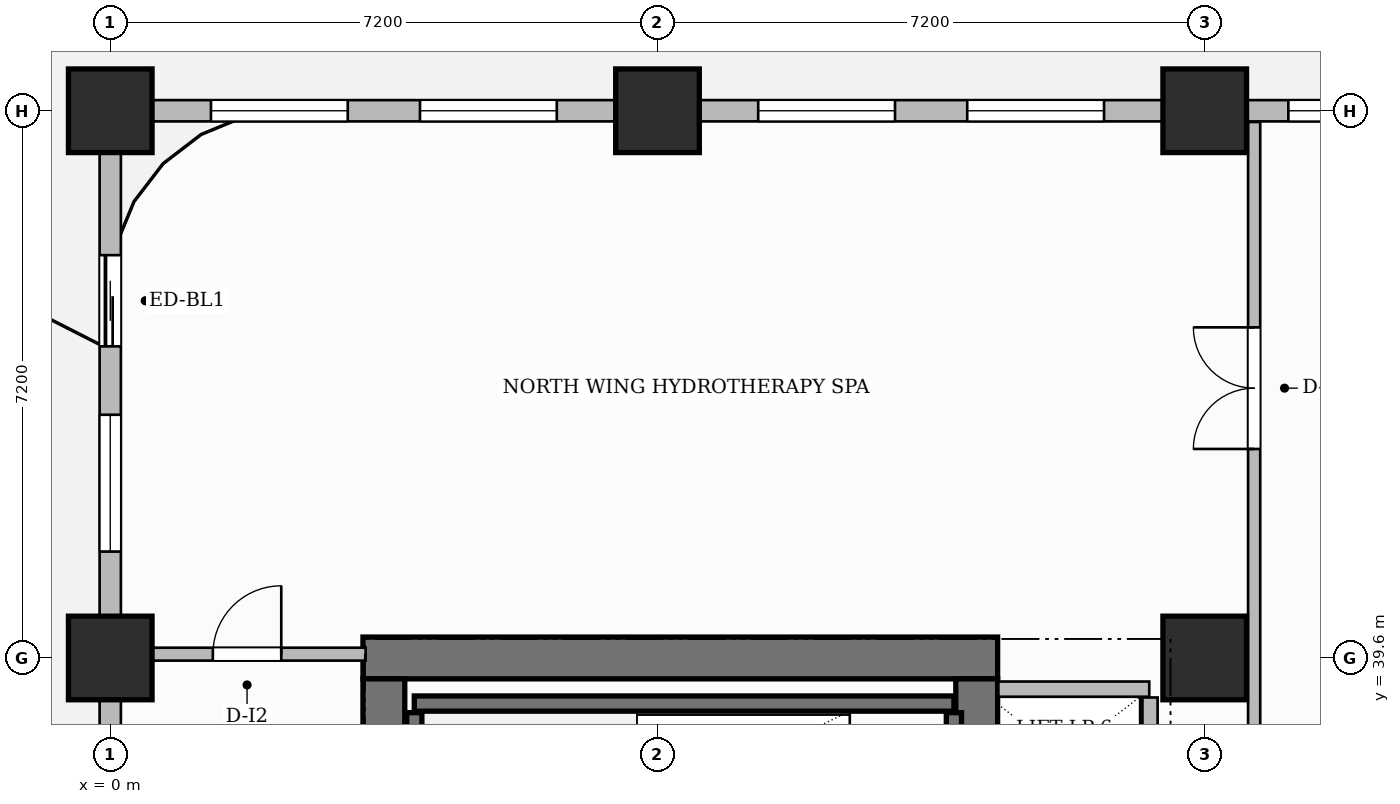
"""IFC4 building model, lengths in metres.
Left out: names, types, materials, properties, quantities, classifications, styles, units other than length and angle.
Written with IfcOpenShell. Run it as: python <this file> out.ifc"""

import sys

from ifc_helpers import new_model, si_unit, direction, frame, frame_2d, origin, origin_2d, place, context, subcontext, project, spatial, rectangle, extrude, source, transform, mapped, element, fill, save


model = new_model("IFC4")
c1 = context("Model", 3, precision=1e-05, world=origin(), true_north=direction((0.0, 1.0)))
c2 = subcontext(c1, "Body", "Model", "MODEL_VIEW")
j1 = project(units=[si_unit("LENGTHUNIT", "METRE"), si_unit("PLANEANGLEUNIT", "RADIAN")], contexts=[c1])
p1 = place(None, origin())
s1 = spatial("IfcSite", under=j1, at=p1, CompositionType="ELEMENT")
p2 = place(p1, origin())
s2 = spatial("IfcBuilding", under=s1, at=p2, CompositionType="ELEMENT")
p3 = place(p2, frame((0.0, 0.0, 95.3)))
s3 = spatial("IfcBuildingStorey", under=s2, at=p3, CompositionType="ELEMENT", Elevation=95.3)
p4 = place(p3, frame((3.325, 39.6, 0.0), z_axis=(0.0, 0.0, 1.0), x_axis=(1.0, 0.0, 0.0)))
e1 = element("IfcWall", 1, at=p4, inside=s3, PredefinedType="SHEAR", context=c2, shape_type="SweptSolid", body=[
    extrude(rectangle(XDim=8.35, YDim=0.55, at=frame_2d((4.175, 0.0))), origin(), (0.0, 0.0, 1.0), 3.7),
])
p5 = place(p3, frame((3.6, 25.475, 0.0), z_axis=(0.0, 0.0, 1.0), x_axis=(0.0, 1.0, 0.0)))
e2 = element("IfcWall", 2, at=p5, inside=s3, PredefinedType="SHEAR", context=c2, shape_type="SweptSolid", body=[
    extrude(rectangle(XDim=13.85, YDim=0.55, at=frame_2d((6.925, 0.0))), origin(), (0.0, 0.0, 1.0), 3.7),
])
p6 = place(p3, frame((11.4, 25.475, 0.0), z_axis=(0.0, 0.0, 1.0), x_axis=(0.0, 1.0, 0.0)))
e3 = element("IfcWall", 3, at=p6, inside=s3, PredefinedType="SHEAR", context=c2, shape_type="SweptSolid", body=[
    extrude(rectangle(XDim=13.85, YDim=0.55, at=frame_2d((6.925, 0.0))), origin(), (0.0, 0.0, 1.0), 3.7),
])
p7 = place(p6, frame((6.495, 0.0, 0.0)))
e4 = element("IfcOpeningElement", 4, at=p7, cuts=e3, PredefinedType="OPENING", context=c2, shape_type="SweptSolid", body=[
    extrude(rectangle(XDim=1.5, YDim=2.2, at=frame_2d((0.75, 1.1))), frame((0.0, 0.285, 0.0), z_axis=(0.0, -1.0, 0.0), x_axis=(1.0, 0.0, 0.0)), (0.0, 0.0, 1.0), 0.57),
])
m1 = source(origin(), c2, "Body", "SweptSolid", [
    extrude(rectangle(XDim=1.1, YDim=1.1, at=origin_2d()), origin(), (0.0, 0.0, 1.0), 3.7),
])
for number, where, z_axis, x_axis in (
    (5, (0.0, 39.6, 0.0), (0.0, 0.0, 1.0), (1.0, 0.0, 0.0)),
    (6, (0.0, 46.8, 0.0), (0.0, 0.0, 1.0), (1.0, 0.0, 0.0)),
    (7, (7.2, 46.8, 0.0), (0.0, 0.0, 1.0), (1.0, 0.0, 0.0)),
    (8, (14.4, 39.6, 0.0), (0.0, 0.0, 1.0), (1.0, 0.0, 0.0)),
    (9, (14.4, 46.8, 0.0), (0.0, 0.0, 1.0), (1.0, 0.0, 0.0)),
):
    element("IfcColumn", number, at=place(p3, frame(where, z_axis=z_axis, x_axis=x_axis)), inside=s3, PredefinedType="COLUMN", context=c2, shape_type="MappedRepresentation", body=[
        mapped(m1, transform((0.0, 0.0, 0.0), scale=1.0)),
    ])
p8 = place(p3, frame((4.0, 39.0, 0.0), z_axis=(0.0, 0.0, 1.0), x_axis=(1.0, 0.0, 0.0)))
e10 = element("IfcWall", 10, at=p8, inside=s3, PredefinedType="SHEAR", context=c2, shape_type="SweptSolid", body=[
    extrude(rectangle(XDim=7.1, YDim=0.2, at=frame_2d((3.55, 0.0))), origin(), (0.0, 0.0, 1.0), 3.7),
])
for number, where, z_axis, x_axis in (
    (11, (4.0, 36.18, 0.0), (0.0, 0.0, 1.0), (0.0, 1.0, 0.0)),
    (12, (11.1, 36.18, 0.0), (0.0, 0.0, 1.0), (0.0, 1.0, 0.0)),
):
    element("IfcWall", number, at=place(p3, frame(where, z_axis=z_axis, x_axis=x_axis)), inside=s3, PredefinedType="SHEAR", context=c2, shape_type="SweptSolid", body=[
        extrude(rectangle(XDim=2.7, YDim=0.2, at=frame_2d((1.35, 0.0))), origin(), (0.0, 0.0, 1.0), 3.7),
    ])
p9 = place(p3, frame((11.685, 39.19, 0.0), z_axis=(0.0, 0.0, 1.0), x_axis=(1.0, 0.0, 0.0)))
e13 = element("IfcWall", 13, at=p9, inside=s3, PredefinedType="PARTITIONING", context=c2, shape_type="SweptSolid", body=[
    extrude(rectangle(XDim=1.985, YDim=0.2, at=frame_2d((0.992, 0.0))), origin(), (0.0, 0.0, 1.0), 3.45),
])
p10 = place(p3, frame((13.68, 34.36, 0.0), z_axis=(0.0, 0.0, 1.0), x_axis=(0.0, 1.0, 0.0)))
e14 = element("IfcWall", 14, at=p10, inside=s3, PredefinedType="PARTITIONING", context=c2, shape_type="SweptSolid", body=[
    extrude(rectangle(XDim=4.72, YDim=0.2, at=frame_2d((2.36, 0.0))), origin(), (0.0, 0.0, 1.0), 3.45),
])
p11 = place(p3, frame((0.24, 39.65, 0.0), z_axis=(0.0, 0.0, 1.0), x_axis=(1.0, 0.0, 0.0)))
e15 = element("IfcWall", 15, at=p11, inside=s3, PredefinedType="PARTITIONING", context=c2, shape_type="SweptSolid", body=[
    extrude(rectangle(XDim=3.12, YDim=0.17, at=frame_2d((1.56, 0.0))), origin(), (0.0, 0.0, 1.0), 3.45),
])
p12 = place(p11, frame((1.11, 0.0, 0.0)))
e16 = element("IfcOpeningElement", 16, at=p12, cuts=e15, PredefinedType="OPENING", context=c2, shape_type="SweptSolid", body=[
    extrude(rectangle(XDim=0.9, YDim=2.15, at=frame_2d((0.45, 1.075))), frame((0.0, 0.095, 0.0), z_axis=(0.0, -1.0, 0.0), x_axis=(1.0, 0.0, 0.0)), (0.0, 0.0, 1.0), 0.19),
])
p13 = place(p3, frame((15.05, 34.34, 0.0), z_axis=(0.0, 0.0, 1.0), x_axis=(0.0, 1.0, 0.0)))
e17 = element("IfcWall", 17, at=p13, inside=s3, PredefinedType="PARTITIONING", context=c2, shape_type="SweptSolid", body=[
    extrude(rectangle(XDim=12.312, YDim=0.16, at=frame_2d((6.156, 0.0))), origin(), (0.0, 0.0, 1.0), 3.45),
])
p14 = place(p13, frame((8.01, 0.0, 0.0)))
e18 = element("IfcOpeningElement", 18, at=p14, cuts=e17, PredefinedType="OPENING", context=c2, shape_type="SweptSolid", body=[
    extrude(rectangle(XDim=1.6, YDim=2.4, at=frame_2d((0.8, 1.2))), frame((0.0, 0.09, 0.0), z_axis=(0.0, -1.0, 0.0), x_axis=(1.0, 0.0, 0.0)), (0.0, 0.0, 1.0), 0.18),
])
p15 = place(p3, frame((0.0, 25.25, 0.0), z_axis=(0.0, 0.0, 1.0), x_axis=(0.0, 1.0, 0.0)))
e19 = element("IfcWall", 19, at=p15, inside=s3, PredefinedType="SOLIDWALL", context=c2, shape_type="SweptSolid", body=[
    extrude(rectangle(XDim=21.5, YDim=0.28, at=frame_2d((10.75, 0.0))), origin(), (0.0, 0.0, 1.0), 2.885),
])
p16 = place(p15, frame((18.45, 0.0, 0.0)))
e20 = element("IfcOpeningElement", 20, at=p16, cuts=e19, PredefinedType="OPENING", context=c2, shape_type="SweptSolid", body=[
    extrude(rectangle(XDim=1.2, YDim=2.2, at=frame_2d((0.6, 1.1))), frame((0.0, 0.15, 0.0), z_axis=(0.0, -1.0, 0.0), x_axis=(1.0, 0.0, 0.0)), (0.0, 0.0, 1.0), 0.3),
])
p17 = place(p15, frame((0.8, 0.0, 0.0)))
e21 = element("IfcOpeningElement", 21, at=p17, cuts=e19, PredefinedType="OPENING", context=c2, shape_type="SweptSolid", body=[
    extrude(rectangle(XDim=1.2, YDim=2.2, at=frame_2d((0.6, 1.1))), frame((0.0, 0.15, 0.0), z_axis=(0.0, -1.0, 0.0), x_axis=(1.0, 0.0, 0.0)), (0.0, 0.0, 1.0), 0.3),
])
p18 = place(p15, frame((3.425, 0.0, 0.8)))
e22 = element("IfcOpeningElement", 22, at=p18, cuts=e19, PredefinedType="OPENING", context=c2, shape_type="SweptSolid", body=[
    extrude(rectangle(XDim=1.8, YDim=1.85, at=frame_2d((0.9, 0.925))), frame((0.0, 0.15, 0.0), z_axis=(0.0, -1.0, 0.0), x_axis=(1.0, 0.0, 0.0)), (0.0, 0.0, 1.0), 0.3),
])
p19 = place(p15, frame((8.475, 0.0, 0.8)))
e23 = element("IfcOpeningElement", 23, at=p19, cuts=e19, PredefinedType="OPENING", context=c2, shape_type="SweptSolid", body=[
    extrude(rectangle(XDim=1.8, YDim=1.85, at=frame_2d((0.9, 0.925))), frame((0.0, 0.15, 0.0), z_axis=(0.0, -1.0, 0.0), x_axis=(1.0, 0.0, 0.0)), (0.0, 0.0, 1.0), 0.3),
])
p20 = place(p15, frame((11.225, 0.0, 0.8)))
e24 = element("IfcOpeningElement", 24, at=p20, cuts=e19, PredefinedType="OPENING", context=c2, shape_type="SweptSolid", body=[
    extrude(rectangle(XDim=1.8, YDim=1.85, at=frame_2d((0.9, 0.925))), frame((0.0, 0.15, 0.0), z_axis=(0.0, -1.0, 0.0), x_axis=(1.0, 0.0, 0.0)), (0.0, 0.0, 1.0), 0.3),
])
p21 = place(p15, frame((15.75, 0.0, 0.8)))
e25 = element("IfcOpeningElement", 25, at=p21, cuts=e19, PredefinedType="OPENING", context=c2, shape_type="SweptSolid", body=[
    extrude(rectangle(XDim=1.8, YDim=1.85, at=frame_2d((0.9, 0.925))), frame((0.0, 0.15, 0.0), z_axis=(0.0, -1.0, 0.0), x_axis=(1.0, 0.0, 0.0)), (0.0, 0.0, 1.0), 0.3),
])
p22 = place(p3, frame((0.0, 46.8, 0.0), z_axis=(0.0, 0.0, 1.0), x_axis=(1.0, 0.0, 0.0)))
e26 = element("IfcWall", 26, at=p22, inside=s3, PredefinedType="SOLIDWALL", context=c2, shape_type="SweptSolid", body=[
    extrude(rectangle(XDim=18.0, YDim=0.28, at=frame_2d((9.0, 0.0))), origin(), (0.0, 0.0, 1.0), 2.885),
])
p23 = place(p22, frame((1.325, 0.0, 0.8)))
e27 = element("IfcOpeningElement", 27, at=p23, cuts=e26, PredefinedType="OPENING", context=c2, shape_type="SweptSolid", body=[
    extrude(rectangle(XDim=1.8, YDim=1.85, at=frame_2d((0.9, 0.925))), frame((0.0, 0.15, 0.0), z_axis=(0.0, -1.0, 0.0), x_axis=(1.0, 0.0, 0.0)), (0.0, 0.0, 1.0), 0.3),
])
p24 = place(p22, frame((4.075, 0.0, 0.8)))
e28 = element("IfcOpeningElement", 28, at=p24, cuts=e26, PredefinedType="OPENING", context=c2, shape_type="SweptSolid", body=[
    extrude(rectangle(XDim=1.8, YDim=1.85, at=frame_2d((0.9, 0.925))), frame((0.0, 0.15, 0.0), z_axis=(0.0, -1.0, 0.0), x_axis=(1.0, 0.0, 0.0)), (0.0, 0.0, 1.0), 0.3),
])
p25 = place(p22, frame((8.525, 0.0, 0.8)))
e29 = element("IfcOpeningElement", 29, at=p25, cuts=e26, PredefinedType="OPENING", context=c2, shape_type="SweptSolid", body=[
    extrude(rectangle(XDim=1.8, YDim=1.85, at=frame_2d((0.9, 0.925))), frame((0.0, 0.15, 0.0), z_axis=(0.0, -1.0, 0.0), x_axis=(1.0, 0.0, 0.0)), (0.0, 0.0, 1.0), 0.3),
])
p26 = place(p22, frame((11.275, 0.0, 0.8)))
e30 = element("IfcOpeningElement", 30, at=p26, cuts=e26, PredefinedType="OPENING", context=c2, shape_type="SweptSolid", body=[
    extrude(rectangle(XDim=1.8, YDim=1.85, at=frame_2d((0.9, 0.925))), frame((0.0, 0.15, 0.0), z_axis=(0.0, -1.0, 0.0), x_axis=(1.0, 0.0, 0.0)), (0.0, 0.0, 1.0), 0.3),
])
p27 = place(p22, frame((15.5, 0.0, 0.8)))
e31 = element("IfcOpeningElement", 31, at=p27, cuts=e26, PredefinedType="OPENING", context=c2, shape_type="SweptSolid", body=[
    extrude(rectangle(XDim=1.4, YDim=1.85, at=frame_2d((0.7, 0.925))), frame((0.0, 0.15, 0.0), z_axis=(0.0, -1.0, 0.0), x_axis=(1.0, 0.0, 0.0)), (0.0, 0.0, 1.0), 0.3),
])
m2 = source(origin(), c2, "Body", "SweptSolid", [
    extrude(rectangle(XDim=0.9, YDim=2.15, at=frame_2d((0.45, 1.075))), frame((0.0, 0.025, 0.0), z_axis=(0.0, -1.0, 0.0), x_axis=(1.0, 0.0, 0.0)), (0.0, 0.0, 1.0), 0.05),
])
p28 = place(p12, origin())
e32 = element("IfcDoor", 32, at=p28, inside=s3, OperationType="SINGLE_SWING_RIGHT", PredefinedType="DOOR", context=c2, shape_type="MappedRepresentation", body=[
    mapped(m2, transform((0.0, 0.0, 0.0), scale=1.0)),
])
fill(e16, e32)
m3 = source(origin(), c2, "Body", "SweptSolid", [
    extrude(rectangle(XDim=1.6, YDim=2.4, at=frame_2d((0.8, 1.2))), frame((0.0, 0.025, 0.0), z_axis=(0.0, -1.0, 0.0), x_axis=(1.0, 0.0, 0.0)), (0.0, 0.0, 1.0), 0.05),
])
p29 = place(p14, origin())
e33 = element("IfcDoor", 33, at=p29, inside=s3, OperationType="DOUBLE_DOOR_SINGLE_SWING", PredefinedType="DOOR", context=c2, shape_type="MappedRepresentation", body=[
    mapped(m3, transform((0.0, 0.0, 0.0), scale=1.0)),
])
fill(e18, e33)
m4 = source(origin(), c2, "Body", "SweptSolid", [
    extrude(rectangle(XDim=1.2, YDim=2.2, at=frame_2d((0.6, 1.1))), frame((0.0, 0.025, 0.0), z_axis=(0.0, -1.0, 0.0), x_axis=(1.0, 0.0, 0.0)), (0.0, 0.0, 1.0), 0.05),
])
p30 = place(p16, origin())
e34 = element("IfcDoor", 34, at=p30, inside=s3, OperationType="SLIDING_TO_LEFT", PredefinedType="DOOR", context=c2, shape_type="MappedRepresentation", body=[
    mapped(m4, transform((0.0, 0.0, 0.0), scale=1.0)),
])
fill(e20, e34)
m5 = source(origin(), c2, "Body", "SweptSolid", [
    extrude(rectangle(XDim=1.8, YDim=1.85, at=frame_2d((0.9, 0.925))), frame((0.0, 0.03, 0.0), z_axis=(0.0, -1.0, 0.0), x_axis=(1.0, 0.0, 0.0)), (0.0, 0.0, 1.0), 0.06),
])
p31 = place(p21, origin())
e35 = element("IfcWindow", 35, at=p31, inside=s3, PartitioningType="DOUBLE_PANEL_VERTICAL", PredefinedType="WINDOW", context=c2, shape_type="MappedRepresentation", body=[
    mapped(m5, transform((0.0, 0.0, 0.0), scale=1.0)),
])
fill(e25, e35)
p32 = place(p23, origin())
e36 = element("IfcWindow", 36, at=p32, inside=s3, PartitioningType="DOUBLE_PANEL_VERTICAL", PredefinedType="WINDOW", context=c2, shape_type="MappedRepresentation", body=[
    mapped(m5, transform((0.0, 0.0, 0.0), scale=1.0)),
])
fill(e27, e36)
p33 = place(p24, origin())
e37 = element("IfcWindow", 37, at=p33, inside=s3, PartitioningType="DOUBLE_PANEL_VERTICAL", PredefinedType="WINDOW", context=c2, shape_type="MappedRepresentation", body=[
    mapped(m5, transform((0.0, 0.0, 0.0), scale=1.0)),
])
fill(e28, e37)
p34 = place(p25, origin())
e38 = element("IfcWindow", 38, at=p34, inside=s3, PartitioningType="DOUBLE_PANEL_VERTICAL", PredefinedType="WINDOW", context=c2, shape_type="MappedRepresentation", body=[
    mapped(m5, transform((0.0, 0.0, 0.0), scale=1.0)),
])
fill(e29, e38)
p35 = place(p26, origin())
e39 = element("IfcWindow", 39, at=p35, inside=s3, PartitioningType="DOUBLE_PANEL_VERTICAL", PredefinedType="WINDOW", context=c2, shape_type="MappedRepresentation", body=[
    mapped(m5, transform((0.0, 0.0, 0.0), scale=1.0)),
])
fill(e30, e39)
m6 = source(origin(), c2, "Body", "SweptSolid", [
    extrude(rectangle(XDim=1.4, YDim=1.85, at=frame_2d((0.7, 0.925))), frame((0.0, 0.03, 0.0), z_axis=(0.0, -1.0, 0.0), x_axis=(1.0, 0.0, 0.0)), (0.0, 0.0, 1.0), 0.06),
])
p36 = place(p27, origin())
e40 = element("IfcWindow", 40, at=p36, inside=s3, PartitioningType="SINGLE_PANEL", PredefinedType="WINDOW", context=c2, shape_type="MappedRepresentation", body=[
    mapped(m6, transform((0.0, 0.0, 0.0), scale=1.0)),
])
fill(e31, e40)
save(model, sys.argv[1])
